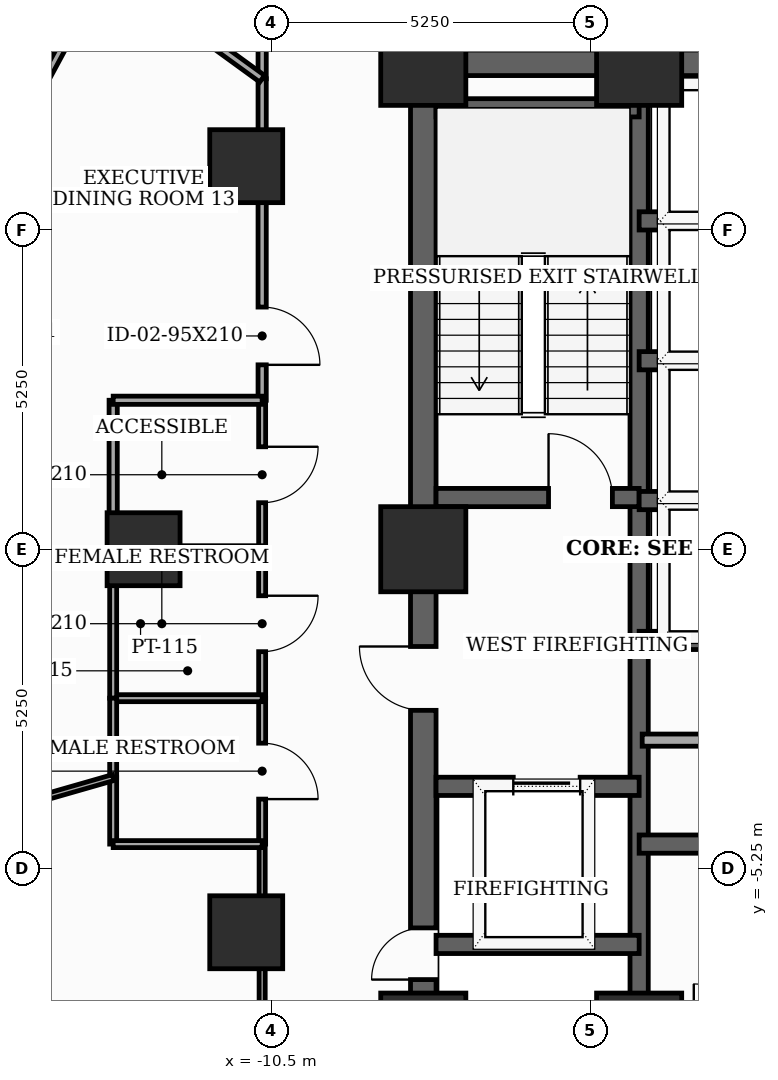
"""IFC4 building model, lengths in metres.
Left out: names, types, materials, properties, quantities, classifications, styles, units other than length and angle.
Written with IfcOpenShell. Run it as: python <this file> out.ifc"""

import sys

from ifc_helpers import new_model, si_unit, direction, frame, frame_2d, origin, origin_2d, place, context, subcontext, project, spatial, rectangle, extrude, element, fill, save


model = new_model("IFC4")
c1 = context("Model", 3, precision=1e-05, world=origin(), true_north=direction((0.0, 1.0)))
c2 = subcontext(c1, "Body", "Model", "MODEL_VIEW")
j1 = project(units=[si_unit("LENGTHUNIT", "METRE"), si_unit("PLANEANGLEUNIT", "RADIAN")], contexts=[c1])
p1 = place(None, origin())
s1 = spatial("IfcSite", under=j1, at=p1, CompositionType="ELEMENT")
p2 = place(p1, origin())
s2 = spatial("IfcBuilding", under=s1, at=p2, CompositionType="ELEMENT")
p3 = place(p2, frame((0.0, 0.0, 112.5)))
s3 = spatial("IfcBuildingStorey", under=s2, at=p3, CompositionType="ELEMENT", Elevation=112.5)
for number, where, z_axis, x_axis in (
    (1, (-8.0, -8.0, 0.0), (0.0, 0.0, 1.0), (1.0, 0.0, 0.0)),
    (2, (-4.45, -8.0, 0.0), (0.0, 0.0, 1.0), (1.0, 0.0, 0.0)),
    (3, (-4.45, 8.0, 0.0), (0.0, 0.0, 1.0), (1.0, 0.0, 0.0)),
    (4, (-8.0, 8.0, 0.0), (0.0, 0.0, 1.0), (1.0, 0.0, 0.0)),
    (5, (-8.0, 0.0, 0.0), (0.0, 0.0, 1.0), (1.0, 0.0, 0.0)),
):
    element("IfcColumn", number, at=place(p3, frame(where, z_axis=z_axis, x_axis=x_axis)), inside=s3, PredefinedType="COLUMN", context=c2, shape_type="SweptSolid", body=[
        extrude(rectangle(XDim=1.4, YDim=1.4, at=origin_2d()), origin(), (0.0, 0.0, 1.0), 3.7),
    ])
for number, where, z_axis, x_axis in (
    (6, (-10.912, 6.3, 0.0), (0.0, 0.0, 1.0), (1.0, 0.0, 0.0)),
    (7, (-12.6, 0.0, 0.0), (0.0, 0.0, 1.0), (1.0, 0.0, 0.0)),
    (8, (-10.912, -6.3, 0.0), (0.0, 0.0, 1.0), (1.0, 0.0, 0.0)),
):
    element("IfcColumn", number, at=place(p3, frame(where, z_axis=z_axis, x_axis=x_axis)), inside=s3, PredefinedType="COLUMN", context=c2, shape_type="SweptSolid", body=[
        extrude(rectangle(XDim=1.2, YDim=1.2, at=origin_2d()), origin(), (0.0, 0.0, 1.0), 3.7),
    ])
p4 = place(p3, frame((-8.0, -8.0, 0.0), z_axis=(0.0, 0.0, 1.0), x_axis=(0.0, 1.0, 0.0)))
e9 = element("IfcWall", 9, at=p4, inside=s3, PredefinedType="SHEAR", context=c2, shape_type="SweptSolid", body=[
    extrude(rectangle(XDim=16.0, YDim=0.42, at=frame_2d((8.0, 0.0))), origin(), (0.0, 0.0, 1.0), 3.5),
])
p5 = place(p4, frame((0.922, 0.0, 0.0)))
e10 = element("IfcOpeningElement", 10, at=p5, cuts=e9, PredefinedType="OPENING", context=c2, shape_type="SweptSolid", body=[
    extrude(rectangle(XDim=0.85, YDim=2.02, at=frame_2d((0.425, 1.01))), frame((0.0, 0.22, 0.0), z_axis=(0.0, -1.0, 0.0), x_axis=(1.0, 0.0, 0.0)), (0.0, 0.0, 1.0), 0.44),
])
p6 = place(p4, frame((5.35, 0.0, 0.0)))
e11 = element("IfcOpeningElement", 11, at=p6, cuts=e9, PredefinedType="OPENING", context=c2, shape_type="SweptSolid", body=[
    extrude(rectangle(XDim=1.05, YDim=2.15, at=frame_2d((0.525, 1.075))), frame((0.0, 0.22, 0.0), z_axis=(0.0, -1.0, 0.0), x_axis=(1.0, 0.0, 0.0)), (0.0, 0.0, 1.0), 0.44),
])
p7 = place(p3, frame((-8.0, 8.0, 0.0), z_axis=(0.0, 0.0, 1.0), x_axis=(1.0, 0.0, 0.0)))
e12 = element("IfcWall", 12, at=p7, inside=s3, PredefinedType="SHEAR", context=c2, shape_type="SweptSolid", body=[
    extrude(rectangle(XDim=16.0, YDim=0.42, at=frame_2d((8.0, 0.0))), origin(), (0.0, 0.0, 1.0), 3.5),
])
p8 = place(p7, frame((7.1, 0.0, 0.0)))
e13 = element("IfcOpeningElement", 13, at=p8, cuts=e12, PredefinedType="OPENING", context=c2, shape_type="SweptSolid", body=[
    extrude(rectangle(XDim=1.8, YDim=2.15, at=frame_2d((0.9, 1.075))), frame((0.0, 0.22, 0.0), z_axis=(0.0, -1.0, 0.0), x_axis=(1.0, 0.0, 0.0)), (0.0, 0.0, 1.0), 0.44),
])
p9 = place(p3, frame((-4.45, -7.79, 0.0), z_axis=(0.0, 0.0, 1.0), x_axis=(0.0, 1.0, 0.0)))
e14 = element("IfcWall", 14, at=p9, inside=s3, PredefinedType="SHEAR", context=c2, shape_type="SweptSolid", body=[
    extrude(rectangle(XDim=15.58, YDim=0.3, at=frame_2d((7.79, 0.0))), origin(), (0.0, 0.0, 1.0), 3.5),
])
p10 = place(p3, frame((-7.79, 0.85, 0.0), z_axis=(0.0, 0.0, 1.0), x_axis=(1.0, 0.0, 0.0)))
e15 = element("IfcWall", 15, at=p10, inside=s3, PredefinedType="SHEAR", context=c2, shape_type="SweptSolid", body=[
    extrude(rectangle(XDim=3.34, YDim=0.3, at=frame_2d((1.67, 0.0))), origin(), (0.0, 0.0, 1.0), 3.5),
])
p11 = place(p10, frame((1.85, 0.0, 0.0)))
e16 = element("IfcOpeningElement", 16, at=p11, cuts=e15, PredefinedType="OPENING", context=c2, shape_type="SweptSolid", body=[
    extrude(rectangle(XDim=1.05, YDim=2.15, at=frame_2d((0.525, 1.075))), frame((0.0, 0.16, 0.0), z_axis=(0.0, -1.0, 0.0), x_axis=(1.0, 0.0, 0.0)), (0.0, 0.0, 1.0), 0.32),
])
p12 = place(p3, frame((-7.79, 7.26, 0.0), z_axis=(0.0, 0.0, 1.0), x_axis=(1.0, 0.0, 0.0)))
e17 = element("IfcWall", 17, at=p12, inside=s3, PredefinedType="SHEAR", context=c2, shape_type="SweptSolid", body=[
    extrude(rectangle(XDim=3.34, YDim=0.3, at=frame_2d((1.67, 0.0))), origin(), (0.0, 0.0, 1.0), 3.5),
])
p13 = place(p3, frame((-7.79, -3.9, 0.0), z_axis=(0.0, 0.0, 1.0), x_axis=(1.0, 0.0, 0.0)))
e18 = element("IfcWall", 18, at=p13, inside=s3, PredefinedType="SHEAR", context=c2, shape_type="SweptSolid", body=[
    extrude(rectangle(XDim=3.34, YDim=0.3, at=frame_2d((1.67, 0.0))), origin(), (0.0, 0.0, 1.0), 3.5),
])
p14 = place(p13, frame((1.27, 0.0, 0.0)))
e19 = element("IfcOpeningElement", 19, at=p14, cuts=e18, PredefinedType="OPENING", context=c2, shape_type="SweptSolid", body=[
    extrude(rectangle(XDim=1.1, YDim=2.1, at=frame_2d((0.55, 1.05))), frame((0.0, 0.16, 0.0), z_axis=(0.0, -1.0, 0.0), x_axis=(1.0, 0.0, 0.0)), (0.0, 0.0, 1.0), 0.32),
])
p15 = place(p3, frame((-7.79, -6.5, 0.0), z_axis=(0.0, 0.0, 1.0), x_axis=(1.0, 0.0, 0.0)))
e20 = element("IfcWall", 20, at=p15, inside=s3, PredefinedType="SHEAR", context=c2, shape_type="SweptSolid", body=[
    extrude(rectangle(XDim=3.34, YDim=0.3, at=frame_2d((1.67, 0.0))), origin(), (0.0, 0.0, 1.0), 3.5),
])
p16 = place(p3, frame((-4.45, -4.85, 0.0), z_axis=(0.0, 0.0, 1.0), x_axis=(1.0, 0.0, 0.0)))
e21 = element("IfcWall", 21, at=p16, inside=s3, PredefinedType="SHEAR", context=c2, shape_type="SweptSolid", body=[
    extrude(rectangle(XDim=8.9, YDim=0.3, at=frame_2d((4.45, 0.0))), origin(), (0.0, 0.0, 1.0), 3.5),
])
for number, where, z_axis, x_axis in (
    (22, (-4.45, -1.5, 0.0), (0.0, 0.0, 1.0), (1.0, 0.0, 0.0)),
    (23, (-4.45, 0.8, 0.0), (0.0, 0.0, 1.0), (1.0, 0.0, 0.0)),
    (24, (-4.45, 3.1, 0.0), (0.0, 0.0, 1.0), (1.0, 0.0, 0.0)),
    (25, (-4.45, 5.4, 0.0), (0.0, 0.0, 1.0), (1.0, 0.0, 0.0)),
):
    element("IfcWall", number, at=place(p3, frame(where, z_axis=z_axis, x_axis=x_axis)), inside=s3, PredefinedType="SHEAR", context=c2, shape_type="SweptSolid", body=[
        extrude(rectangle(XDim=2.77, YDim=0.3, at=frame_2d((1.385, 0.0))), origin(), (0.0, 0.0, 1.0), 3.5),
    ])
p17 = place(p3, frame((-4.4, -3.14, 0.0), z_axis=(0.0, 0.0, 1.0), x_axis=(1.0, 0.0, 0.0)))
e26 = element("IfcWall", 26, at=p17, inside=s3, PredefinedType="SOLIDWALL", context=c2, shape_type="SweptSolid", body=[
    extrude(rectangle(XDim=2.68, YDim=0.2, at=frame_2d((1.34, 0.0))), origin(), (0.0, 0.0, 1.0), 3.5),
])
p18 = place(p3, frame((-10.65, 0.0, 0.0), z_axis=(0.0, 0.0, 1.0), x_axis=(0.0, -1.0, 0.0)))
e27 = element("IfcWall", 27, at=p18, inside=s3, PredefinedType="PARTITIONING", context=c2, shape_type="SweptSolid", body=[
    extrude(rectangle(XDim=2.45, YDim=0.115, at=frame_2d((1.225, 0.0))), origin(), (0.0, 0.0, 1.0), 2.785),
])
p19 = place(p18, frame((0.765, 0.0, 0.0)))
e28 = element("IfcOpeningElement", 28, at=p19, cuts=e27, PredefinedType="OPENING", context=c2, shape_type="SweptSolid", body=[
    extrude(rectangle(XDim=0.92, YDim=2.1, at=frame_2d((0.46, 1.05))), frame((0.0, 0.067, 0.0), z_axis=(0.0, -1.0, 0.0), x_axis=(1.0, 0.0, 0.0)), (0.0, 0.0, 1.0), 0.135),
])
p20 = place(p3, frame((-10.65, -2.45, 0.0), z_axis=(0.0, 0.0, 1.0), x_axis=(0.0, -1.0, 0.0)))
e29 = element("IfcWall", 29, at=p20, inside=s3, PredefinedType="PARTITIONING", context=c2, shape_type="SweptSolid", body=[
    extrude(rectangle(XDim=2.4, YDim=0.115, at=frame_2d((1.2, 0.0))), origin(), (0.0, 0.0, 1.0), 3.5),
])
p21 = place(p20, frame((0.74, 0.0, 0.0)))
e30 = element("IfcOpeningElement", 30, at=p21, cuts=e29, PredefinedType="OPENING", context=c2, shape_type="SweptSolid", body=[
    extrude(rectangle(XDim=0.92, YDim=2.1, at=frame_2d((0.46, 1.05))), frame((0.0, 0.067, 0.0), z_axis=(0.0, -1.0, 0.0), x_axis=(1.0, 0.0, 0.0)), (0.0, 0.0, 1.0), 0.135),
])
p22 = place(p3, frame((-10.65, -4.85, 0.0), z_axis=(0.0, 0.0, 1.0), x_axis=(0.0, -1.0, 0.0)))
e31 = element("IfcWall", 31, at=p22, inside=s3, PredefinedType="MOVABLE", context=c2, shape_type="SweptSolid", body=[
    extrude(rectangle(XDim=5.3, YDim=0.1, at=frame_2d((2.65, 0.0))), origin(), (0.0, 0.0, 1.0), 2.785),
])
p23 = place(p22, frame((3.78, 0.0, 0.0)))
e32 = element("IfcOpeningElement", 32, at=p23, cuts=e31, PredefinedType="OPENING", context=c2, shape_type="SweptSolid", body=[
    extrude(rectangle(XDim=0.92, YDim=2.1, at=frame_2d((0.46, 1.05))), frame((0.0, 0.06, 0.0), z_axis=(0.0, -1.0, 0.0), x_axis=(1.0, 0.0, 0.0)), (0.0, 0.0, 1.0), 0.12),
])
p24 = place(p3, frame((-10.65, 10.15, 0.0), z_axis=(0.0, 0.0, 1.0), x_axis=(0.0, -1.0, 0.0)))
e33 = element("IfcWall", 33, at=p24, inside=s3, PredefinedType="PARTITIONING", context=c2, shape_type="SweptSolid", body=[
    extrude(rectangle(XDim=2.412, YDim=0.135, at=frame_2d((1.206, 0.0))), origin(), (0.0, 0.0, 1.0), 3.5),
])
p25 = place(p24, frame((0.442, 0.0, 0.0)))
e34 = element("IfcOpeningElement", 34, at=p25, cuts=e33, PredefinedType="OPENING", context=c2, shape_type="SweptSolid", body=[
    extrude(rectangle(XDim=0.95, YDim=2.1, at=frame_2d((0.475, 1.05))), frame((0.0, 0.077, 0.0), z_axis=(0.0, -1.0, 0.0), x_axis=(1.0, 0.0, 0.0)), (0.0, 0.0, 1.0), 0.155),
])
p26 = place(p3, frame((-10.65, 7.738, 0.0), z_axis=(0.0, 0.0, 1.0), x_axis=(0.0, -1.0, 0.0)))
e35 = element("IfcWall", 35, at=p26, inside=s3, PredefinedType="PARTITIONING", context=c2, shape_type="SweptSolid", body=[
    extrude(rectangle(XDim=5.288, YDim=0.135, at=frame_2d((2.644, 0.0))), origin(), (0.0, 0.0, 1.0), 2.785),
])
p27 = place(p26, frame((3.755, 0.0, 0.0)))
e36 = element("IfcOpeningElement", 36, at=p27, cuts=e35, PredefinedType="OPENING", context=c2, shape_type="SweptSolid", body=[
    extrude(rectangle(XDim=0.95, YDim=2.1, at=frame_2d((0.475, 1.05))), frame((0.0, 0.077, 0.0), z_axis=(0.0, -1.0, 0.0), x_axis=(1.0, 0.0, 0.0)), (0.0, 0.0, 1.0), 0.155),
])
p28 = place(p3, frame((-10.65, 2.45, 0.0), z_axis=(0.0, 0.0, 1.0), x_axis=(0.0, -1.0, 0.0)))
e37 = element("IfcWall", 37, at=p28, inside=s3, PredefinedType="PARTITIONING", context=c2, shape_type="SweptSolid", body=[
    extrude(rectangle(XDim=2.45, YDim=0.115, at=frame_2d((1.225, 0.0))), origin(), (0.0, 0.0, 1.0), 2.785),
])
p29 = place(p28, frame((0.765, 0.0, 0.0)))
e38 = element("IfcOpeningElement", 38, at=p29, cuts=e37, PredefinedType="OPENING", context=c2, shape_type="SweptSolid", body=[
    extrude(rectangle(XDim=0.92, YDim=2.1, at=frame_2d((0.46, 1.05))), frame((0.0, 0.067, 0.0), z_axis=(0.0, -1.0, 0.0), x_axis=(1.0, 0.0, 0.0)), (0.0, 0.0, 1.0), 0.135),
])
p30 = place(p3, frame((-13.1, -2.45, 0.0), z_axis=(0.0, 0.0, 1.0), x_axis=(1.0, 0.0, 0.0)))
e39 = element("IfcWall", 39, at=p30, inside=s3, PredefinedType="PARTITIONING", context=c2, shape_type="SweptSolid", body=[
    extrude(rectangle(XDim=2.45, YDim=0.115, at=frame_2d((1.225, 0.0))), origin(), (0.0, 0.0, 1.0), 2.785),
])
p31 = place(p3, frame((-13.1, 0.0, 0.0), z_axis=(0.0, 0.0, 1.0), x_axis=(0.0, -1.0, 0.0)))
e40 = element("IfcWall", 40, at=p31, inside=s3, PredefinedType="PARTITIONING", context=c2, shape_type="SweptSolid", body=[
    extrude(rectangle(XDim=2.45, YDim=0.115, at=frame_2d((1.225, 0.0))), origin(), (0.0, 0.0, 1.0), 2.785),
])
p32 = place(p3, frame((-10.65, 0.0, 0.0), z_axis=(0.0, 0.0, 1.0), x_axis=(-1.0, 0.0, 0.0)))
e41 = element("IfcWall", 41, at=p32, inside=s3, PredefinedType="PARTITIONING", context=c2, shape_type="SweptSolid", body=[
    extrude(rectangle(XDim=2.45, YDim=0.115, at=frame_2d((1.225, 0.0))), origin(), (0.0, 0.0, 1.0), 2.785),
])
p33 = place(p3, frame((-13.1, -3.756, 0.0), z_axis=(0.0, 0.0, 1.0), x_axis=(0.0, -1.0, 0.0)))
e42 = element("IfcWall", 42, at=p33, inside=s3, PredefinedType="PARTITIONING", context=c2, shape_type="SweptSolid", body=[
    extrude(rectangle(XDim=1.094, YDim=0.115, at=frame_2d((0.547, 0.0))), origin(), (0.0, 0.0, 1.0), 3.5),
])
p34 = place(p3, frame((-13.1, -4.85, 0.0), z_axis=(0.0, 0.0, 1.0), x_axis=(1.0, 0.0, 0.0)))
e43 = element("IfcWall", 43, at=p34, inside=s3, PredefinedType="PARTITIONING", context=c2, shape_type="SweptSolid", body=[
    extrude(rectangle(XDim=2.45, YDim=0.115, at=frame_2d((1.225, 0.0))), origin(), (0.0, 0.0, 1.0), 2.785),
])
p35 = place(p3, frame((-13.1, -2.45, 0.0), z_axis=(0.0, 0.0, 1.0), x_axis=(0.0, -1.0, 0.0)))
e44 = element("IfcWall", 44, at=p35, inside=s3, PredefinedType="PARTITIONING", context=c2, shape_type="SweptSolid", body=[
    extrude(rectangle(XDim=1.306, YDim=0.115, at=frame_2d((0.653, 0.0))), origin(), (0.0, 0.0, 1.0), 3.5),
])
p36 = place(p3, frame((-13.1, -3.756, 0.0), z_axis=(0.0, 0.0, 1.0), x_axis=(-0.961255453737, -0.275659124029, 0.0)))
e45 = element("IfcWall", 45, at=p36, inside=s3, PredefinedType="MOVABLE", context=c2, shape_type="SweptSolid", body=[
    extrude(rectangle(XDim=6.84, YDim=0.1, at=frame_2d((3.42, 0.0))), origin(), (0.0, 0.0, 1.0), 2.935),
])
p37 = place(p3, frame((-12.724, 9.244, 0.0), z_axis=(0.0, 0.0, 1.0), x_axis=(0.809230060509, -0.587491880087, 0.0)))
e46 = element("IfcWall", 46, at=p37, inside=s3, PredefinedType="PARTITIONING", context=c2, shape_type="SweptSolid", body=[
    extrude(rectangle(XDim=2.563, YDim=0.135, at=frame_2d((1.282, 0.0))), origin(), (0.0, 0.0, 1.0), 3.125),
])
p38 = place(p3, frame((-15.079, 6.149, 0.0), z_axis=(0.0, 0.0, 1.0), x_axis=(0.474585971175, 0.88020915467, 0.0)))
e47 = element("IfcWall", 47, at=p38, inside=s3, PredefinedType="PARTITIONING", context=c2, shape_type="SweptSolid", body=[
    extrude(rectangle(XDim=3.923, YDim=0.135, at=frame_2d((1.961, 0.0))), origin(), (0.0, 0.0, 1.0), 2.785),
])
p39 = place(p38, frame((2.45, 0.0, 0.0)))
e48 = element("IfcOpeningElement", 48, at=p39, cuts=e47, PredefinedType="OPENING", context=c2, shape_type="SweptSolid", body=[
    extrude(rectangle(XDim=0.92, YDim=2.1, at=frame_2d((0.46, 1.05))), frame((0.0, 0.077, 0.0), z_axis=(0.0, -1.0, 0.0), x_axis=(1.0, 0.0, 0.0)), (0.0, 0.0, 1.0), 0.155),
])
p40 = place(p3, frame((-13.1, 0.0, 0.0), z_axis=(0.0, 0.0, 1.0), x_axis=(0.0, 1.0, 0.0)))
e49 = element("IfcWall", 49, at=p40, inside=s3, PredefinedType="PARTITIONING", context=c2, shape_type="SweptSolid", body=[
    extrude(rectangle(XDim=2.45, YDim=0.135, at=frame_2d((1.225, 0.0))), origin(), (0.0, 0.0, 1.0), 2.785),
])
p41 = place(p3, frame((-13.1, 2.45, 0.0), z_axis=(0.0, 0.0, 1.0), x_axis=(1.0, 0.0, 0.0)))
e50 = element("IfcWall", 50, at=p41, inside=s3, PredefinedType="PARTITIONING", context=c2, shape_type="SweptSolid", body=[
    extrude(rectangle(XDim=2.45, YDim=0.135, at=frame_2d((1.225, 0.0))), origin(), (0.0, 0.0, 1.0), 2.785),
])
p42 = place(p5, origin())
e51 = element("IfcDoor", 51, at=p42, inside=s3, OperationType="SINGLE_SWING_LEFT", PredefinedType="TRAPDOOR", context=c2, shape_type="SweptSolid", body=[
    extrude(rectangle(XDim=0.85, YDim=2.02, at=frame_2d((0.425, 1.01))), frame((0.0, 0.025, 0.0), z_axis=(0.0, -1.0, 0.0), x_axis=(1.0, 0.0, 0.0)), (0.0, 0.0, 1.0), 0.05),
])
fill(e10, e51)
p43 = place(p6, origin())
e52 = element("IfcDoor", 52, at=p43, inside=s3, OperationType="SINGLE_SWING_RIGHT", PredefinedType="DOOR", context=c2, shape_type="SweptSolid", body=[
    extrude(rectangle(XDim=1.05, YDim=2.15, at=frame_2d((0.525, 1.075))), frame((0.0, 0.025, 0.0), z_axis=(0.0, -1.0, 0.0), x_axis=(1.0, 0.0, 0.0)), (0.0, 0.0, 1.0), 0.05),
])
fill(e11, e52)
p44 = place(p11, origin())
e53 = element("IfcDoor", 53, at=p44, inside=s3, OperationType="SINGLE_SWING_LEFT", PredefinedType="DOOR", context=c2, shape_type="SweptSolid", body=[
    extrude(rectangle(XDim=1.05, YDim=2.15, at=frame_2d((0.525, 1.075))), frame((0.0, 0.025, 0.0), z_axis=(0.0, -1.0, 0.0), x_axis=(1.0, 0.0, 0.0)), (0.0, 0.0, 1.0), 0.05),
])
fill(e16, e53)
p45 = place(p14, origin())
e54 = element("IfcDoor", 54, at=p45, inside=s3, OperationType="SLIDING_TO_LEFT", PredefinedType="DOOR", context=c2, shape_type="SweptSolid", body=[
    extrude(rectangle(XDim=1.1, YDim=2.1, at=frame_2d((0.55, 1.05))), frame((0.0, 0.025, 0.0), z_axis=(0.0, -1.0, 0.0), x_axis=(1.0, 0.0, 0.0)), (0.0, 0.0, 1.0), 0.05),
])
fill(e19, e54)
p46 = place(p19, origin())
e55 = element("IfcDoor", 55, at=p46, inside=s3, OperationType="SINGLE_SWING_LEFT", PredefinedType="DOOR", context=c2, shape_type="SweptSolid", body=[
    extrude(rectangle(XDim=0.92, YDim=2.1, at=frame_2d((0.46, 1.05))), frame((0.0, 0.025, 0.0), z_axis=(0.0, -1.0, 0.0), x_axis=(1.0, 0.0, 0.0)), (0.0, 0.0, 1.0), 0.05),
])
fill(e28, e55)
p47 = place(p21, origin())
e56 = element("IfcDoor", 56, at=p47, inside=s3, OperationType="SINGLE_SWING_RIGHT", PredefinedType="DOOR", context=c2, shape_type="SweptSolid", body=[
    extrude(rectangle(XDim=0.92, YDim=2.1, at=frame_2d((0.46, 1.05))), frame((0.0, 0.025, 0.0), z_axis=(0.0, -1.0, 0.0), x_axis=(1.0, 0.0, 0.0)), (0.0, 0.0, 1.0), 0.05),
])
fill(e30, e56)
p48 = place(p27, origin())
e57 = element("IfcDoor", 57, at=p48, inside=s3, OperationType="SINGLE_SWING_RIGHT", PredefinedType="DOOR", context=c2, shape_type="SweptSolid", body=[
    extrude(rectangle(XDim=0.95, YDim=2.1, at=frame_2d((0.475, 1.05))), frame((0.0, 0.025, 0.0), z_axis=(0.0, -1.0, 0.0), x_axis=(1.0, 0.0, 0.0)), (0.0, 0.0, 1.0), 0.05),
])
fill(e36, e57)
p49 = place(p29, origin())
e58 = element("IfcDoor", 58, at=p49, inside=s3, OperationType="SINGLE_SWING_LEFT", PredefinedType="DOOR", context=c2, shape_type="SweptSolid", body=[
    extrude(rectangle(XDim=0.92, YDim=2.1, at=frame_2d((0.46, 1.05))), frame((0.0, 0.025, 0.0), z_axis=(0.0, -1.0, 0.0), x_axis=(1.0, 0.0, 0.0)), (0.0, 0.0, 1.0), 0.05),
])
fill(e38, e58)
save(model, sys.argv[1])
